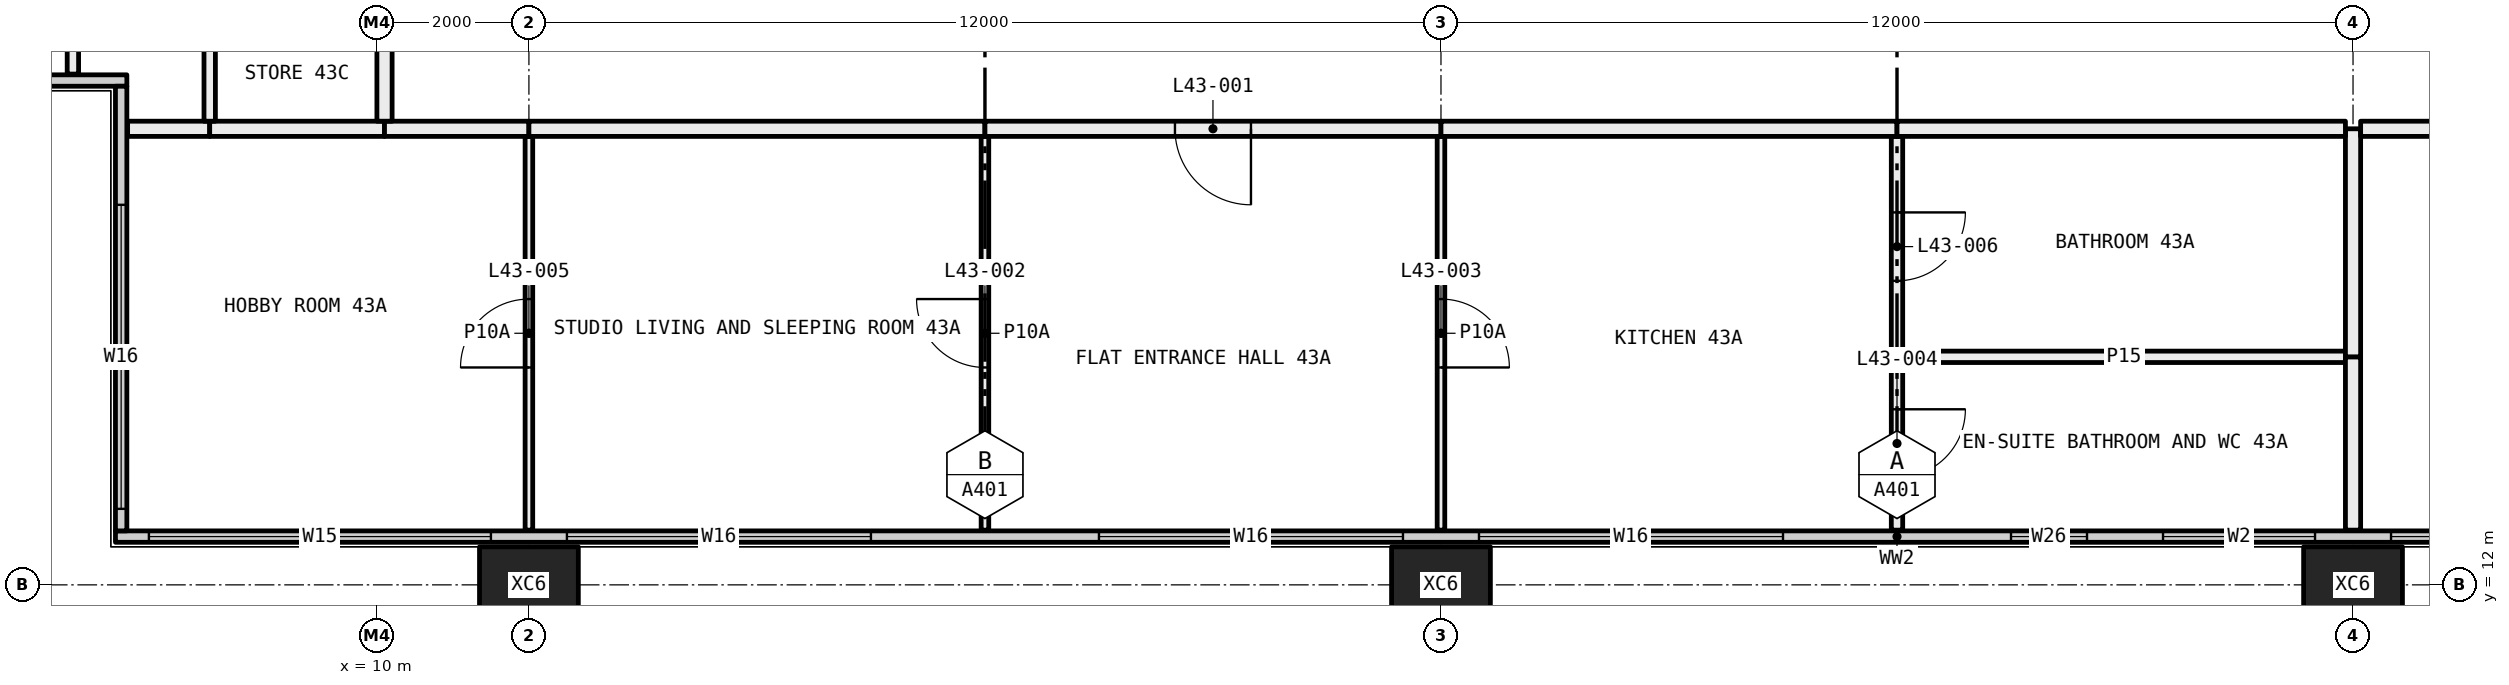
"""IFC4 building model, lengths in metres.
Left out: names, types, materials, properties, quantities, classifications, styles, units other than length and angle.
Written with IfcOpenShell. Run it as: python <this file> out.ifc"""

import sys

from ifc_helpers import new_model, si_unit, direction, frame, frame_2d, origin, origin_2d, place, context, subcontext, project, spatial, rectangle, hollow_rectangle, extrude, element, fill, save


model = new_model("IFC4")
c1 = context("Model", 3, precision=1e-05, world=origin(), true_north=direction((0.0, 1.0)))
c2 = subcontext(c1, "Body", "Model", "MODEL_VIEW")
j1 = project(units=[si_unit("LENGTHUNIT", "METRE"), si_unit("PLANEANGLEUNIT", "RADIAN")], contexts=[c1])
p1 = place(None, origin())
s1 = spatial("IfcSite", under=j1, at=p1, CompositionType="ELEMENT")
p2 = place(p1, origin())
s2 = spatial("IfcBuilding", under=s1, at=p2, CompositionType="ELEMENT")
p3 = place(p2, frame((0.0, 0.0, 165.15)))
s3 = spatial("IfcBuildingStorey", under=s2, at=p3, CompositionType="ELEMENT", Elevation=165.15)
for number, where, z_axis, x_axis in (
    (1, (12.0, 12.0, -0.4), (0.0, 0.0, 1.0), (1.0, 0.0, 0.0)),
    (2, (24.0, 12.0, -0.4), (0.0, 0.0, 1.0), (1.0, 0.0, 0.0)),
    (3, (36.0, 12.0, -0.4), (0.0, 0.0, 1.0), (1.0, 0.0, 0.0)),
):
    element("IfcColumn", number, at=place(p3, frame(where, z_axis=z_axis, x_axis=x_axis)), inside=s3, PredefinedType="COLUMN", context=c2, shape_type="SweptSolid", body=[
        extrude(hollow_rectangle(XDim=1.3, YDim=1.0, WallThickness=0.05, at=origin_2d()), origin(), (0.0, 0.0, 1.0), 3.45),
    ])
p4 = place(p3, frame((6.56, 12.635, 0.0), z_axis=(0.0, 0.0, 1.0), x_axis=(1.0, 0.0, 0.0)))
e4 = element("IfcWall", 4, at=p4, inside=s3, PredefinedType="ELEMENTEDWALL", context=c2, shape_type="SweptSolid", body=[
    extrude(rectangle(XDim=46.88, YDim=0.15, at=frame_2d((23.44, 0.0))), origin(), (0.0, 0.0, 1.0), 3.05),
])
p5 = place(p4, frame((0.44, 0.0, 0.45)))
e5 = element("IfcOpeningElement", 5, at=p5, cuts=e4, PredefinedType="OPENING", context=c2, shape_type="SweptSolid", body=[
    extrude(rectangle(XDim=4.5, YDim=2.55, at=frame_2d((2.25, 1.275))), frame((0.0, 0.085, 0.0), z_axis=(0.0, -1.0, 0.0), x_axis=(1.0, 0.0, 0.0)), (0.0, 0.0, 1.0), 0.17),
])
p6 = place(p4, frame((5.94, 0.0, 0.45)))
e6 = element("IfcOpeningElement", 6, at=p6, cuts=e4, PredefinedType="OPENING", context=c2, shape_type="SweptSolid", body=[
    extrude(rectangle(XDim=4.0, YDim=2.55, at=frame_2d((2.0, 1.275))), frame((0.0, 0.085, 0.0), z_axis=(0.0, -1.0, 0.0), x_axis=(1.0, 0.0, 0.0)), (0.0, 0.0, 1.0), 0.17),
])
p7 = place(p4, frame((12.94, 0.0, 0.45)))
e7 = element("IfcOpeningElement", 7, at=p7, cuts=e4, PredefinedType="OPENING", context=c2, shape_type="SweptSolid", body=[
    extrude(rectangle(XDim=4.0, YDim=2.55, at=frame_2d((2.0, 1.275))), frame((0.0, 0.085, 0.0), z_axis=(0.0, -1.0, 0.0), x_axis=(1.0, 0.0, 0.0)), (0.0, 0.0, 1.0), 0.17),
])
p8 = place(p4, frame((17.94, 0.0, 0.45)))
e8 = element("IfcOpeningElement", 8, at=p8, cuts=e4, PredefinedType="OPENING", context=c2, shape_type="SweptSolid", body=[
    extrude(rectangle(XDim=4.0, YDim=2.55, at=frame_2d((2.0, 1.275))), frame((0.0, 0.085, 0.0), z_axis=(0.0, -1.0, 0.0), x_axis=(1.0, 0.0, 0.0)), (0.0, 0.0, 1.0), 0.17),
])
p9 = place(p4, frame((24.94, 0.0, 0.45)))
e9 = element("IfcOpeningElement", 9, at=p9, cuts=e4, PredefinedType="OPENING", context=c2, shape_type="SweptSolid", body=[
    extrude(rectangle(XDim=1.0, YDim=2.55, at=frame_2d((0.5, 1.275))), frame((0.0, 0.085, 0.0), z_axis=(0.0, -1.0, 0.0), x_axis=(1.0, 0.0, 0.0)), (0.0, 0.0, 1.0), 0.17),
])
p10 = place(p4, frame((26.94, 0.0, 0.45)))
e10 = element("IfcOpeningElement", 10, at=p10, cuts=e4, PredefinedType="OPENING", context=c2, shape_type="SweptSolid", body=[
    extrude(rectangle(XDim=2.0, YDim=2.55, at=frame_2d((1.0, 1.275))), frame((0.0, 0.085, 0.0), z_axis=(0.0, -1.0, 0.0), x_axis=(1.0, 0.0, 0.0)), (0.0, 0.0, 1.0), 0.17),
])
p11 = place(p4, frame((29.94, 0.0, 0.45)))
e11 = element("IfcOpeningElement", 11, at=p11, cuts=e4, PredefinedType="OPENING", context=c2, shape_type="SweptSolid", body=[
    extrude(rectangle(XDim=4.0, YDim=2.55, at=frame_2d((2.0, 1.275))), frame((0.0, 0.085, 0.0), z_axis=(0.0, -1.0, 0.0), x_axis=(1.0, 0.0, 0.0)), (0.0, 0.0, 1.0), 0.17),
])
p12 = place(p4, frame((36.94, 0.0, 0.45)))
e12 = element("IfcOpeningElement", 12, at=p12, cuts=e4, PredefinedType="OPENING", context=c2, shape_type="SweptSolid", body=[
    extrude(rectangle(XDim=4.0, YDim=2.55, at=frame_2d((2.0, 1.275))), frame((0.0, 0.085, 0.0), z_axis=(0.0, -1.0, 0.0), x_axis=(1.0, 0.0, 0.0)), (0.0, 0.0, 1.0), 0.17),
])
p13 = place(p4, frame((41.94, 0.0, 0.45)))
e13 = element("IfcOpeningElement", 13, at=p13, cuts=e4, PredefinedType="OPENING", context=c2, shape_type="SweptSolid", body=[
    extrude(rectangle(XDim=4.5, YDim=2.55, at=frame_2d((2.25, 1.275))), frame((0.0, 0.085, 0.0), z_axis=(0.0, -1.0, 0.0), x_axis=(1.0, 0.0, 0.0)), (0.0, 0.0, 1.0), 0.17),
])
p14 = place(p3, frame((0.56, 18.635, 0.0), z_axis=(0.0, 0.0, 1.0), x_axis=(1.0, 0.0, 0.0)))
e14 = element("IfcWall", 14, at=p14, inside=s3, PredefinedType="ELEMENTEDWALL", context=c2, shape_type="SweptSolid", body=[
    extrude(rectangle(XDim=6.15, YDim=0.15, at=frame_2d((3.075, 0.0))), origin(), (0.0, 0.0, 1.0), 3.05),
])
p15 = place(p14, frame((0.44, 0.0, 0.45)))
e15 = element("IfcOpeningElement", 15, at=p15, cuts=e14, PredefinedType="OPENING", context=c2, shape_type="SweptSolid", body=[
    extrude(rectangle(XDim=4.0, YDim=2.55, at=frame_2d((2.0, 1.275))), frame((0.0, 0.085, 0.0), z_axis=(0.0, -1.0, 0.0), x_axis=(1.0, 0.0, 0.0)), (0.0, 0.0, 1.0), 0.17),
])
p16 = place(p3, frame((6.635, 12.71, 0.0), z_axis=(0.0, 0.0, 1.0), x_axis=(0.0, 1.0, 0.0)))
e16 = element("IfcWall", 16, at=p16, inside=s3, PredefinedType="ELEMENTEDWALL", context=c2, shape_type="SweptSolid", body=[
    extrude(rectangle(XDim=5.85, YDim=0.15, at=frame_2d((2.925, 0.0))), origin(), (0.0, 0.0, 1.0), 3.05),
])
p17 = place(p16, frame((0.29, 0.0, 0.45)))
e17 = element("IfcOpeningElement", 17, at=p17, cuts=e16, PredefinedType="OPENING", context=c2, shape_type="SweptSolid", body=[
    extrude(rectangle(XDim=4.0, YDim=2.55, at=frame_2d((2.0, 1.275))), frame((0.0, 0.085, 0.0), z_axis=(0.0, -1.0, 0.0), x_axis=(1.0, 0.0, 0.0)), (0.0, 0.0, 1.0), 0.17),
])
p18 = place(p3, frame((12.0, 12.72, 0.0), z_axis=(0.0, 0.0, 1.0), x_axis=(0.0, 1.0, 0.0)))
e18 = element("IfcWall", 18, at=p18, inside=s3, PredefinedType="PARTITIONING", context=c2, shape_type="SweptSolid", body=[
    extrude(rectangle(XDim=5.18, YDim=0.1, at=frame_2d((2.59, 0.0))), origin(), (0.0, 0.0, 1.0), 3.05),
])
p19 = place(p18, frame((2.14, 0.0, 0.0)))
e19 = element("IfcOpeningElement", 19, at=p19, cuts=e18, PredefinedType="OPENING", context=c2, shape_type="SweptSolid", body=[
    extrude(rectangle(XDim=0.9, YDim=2.1, at=frame_2d((0.45, 1.05))), frame((0.0, 0.06, 0.0), z_axis=(0.0, -1.0, 0.0), x_axis=(1.0, 0.0, 0.0)), (0.0, 0.0, 1.0), 0.12),
])
p20 = place(p3, frame((7.8, 18.0, 0.0), z_axis=(0.0, 0.0, 1.0), x_axis=(-1.0, 0.0, 0.0)))
e20 = element("IfcWall", 20, at=p20, inside=s3, PredefinedType="PARTITIONING", context=c2, shape_type="SweptSolid", body=[
    extrude(rectangle(XDim=1.08, YDim=0.2, at=frame_2d((0.54, 0.0))), origin(), (0.0, 0.0, 1.0), 3.05),
])
p21 = place(p3, frame((10.1, 18.0, 0.0), z_axis=(0.0, 0.0, 1.0), x_axis=(-1.0, 0.0, 0.0)))
e21 = element("IfcWall", 21, at=p21, inside=s3, PredefinedType="PARTITIONING", context=c2, shape_type="SweptSolid", body=[
    extrude(rectangle(XDim=2.3, YDim=0.2, at=frame_2d((1.15, 0.0))), origin(), (0.0, 0.0, 1.0), 3.05),
])
p22 = place(p3, frame((12.0, 18.0, 0.0), z_axis=(0.0, 0.0, 1.0), x_axis=(-1.0, 0.0, 0.0)))
e22 = element("IfcWall", 22, at=p22, inside=s3, PredefinedType="PARTITIONING", context=c2, shape_type="SweptSolid", body=[
    extrude(rectangle(XDim=1.9, YDim=0.2, at=frame_2d((0.95, 0.0))), origin(), (0.0, 0.0, 1.0), 3.05),
])
p23 = place(p3, frame((18.0, 12.72, 0.0), z_axis=(0.0, 0.0, 1.0), x_axis=(0.0, 1.0, 0.0)))
e23 = element("IfcWall", 23, at=p23, inside=s3, PredefinedType="PARTITIONING", context=c2, shape_type="SweptSolid", body=[
    extrude(rectangle(XDim=5.18, YDim=0.1, at=frame_2d((2.59, 0.0))), origin(), (0.0, 0.0, 1.0), 3.05),
])
p24 = place(p23, frame((2.14, 0.0, 0.0)))
e24 = element("IfcOpeningElement", 24, at=p24, cuts=e23, PredefinedType="OPENING", context=c2, shape_type="SweptSolid", body=[
    extrude(rectangle(XDim=0.9, YDim=2.1, at=frame_2d((0.45, 1.05))), frame((0.0, 0.06, 0.0), z_axis=(0.0, -1.0, 0.0), x_axis=(1.0, 0.0, 0.0)), (0.0, 0.0, 1.0), 0.12),
])
p25 = place(p3, frame((18.0, 18.0, 0.0), z_axis=(0.0, 0.0, 1.0), x_axis=(-1.0, 0.0, 0.0)))
e25 = element("IfcWall", 25, at=p25, inside=s3, PredefinedType="PARTITIONING", context=c2, shape_type="SweptSolid", body=[
    extrude(rectangle(XDim=6.0, YDim=0.2, at=frame_2d((3.0, 0.0))), origin(), (0.0, 0.0, 1.0), 3.05),
])
p26 = place(p3, frame((24.0, 12.72, 0.0), z_axis=(0.0, 0.0, 1.0), x_axis=(0.0, 1.0, 0.0)))
e26 = element("IfcWall", 26, at=p26, inside=s3, PredefinedType="PARTITIONING", context=c2, shape_type="SweptSolid", body=[
    extrude(rectangle(XDim=5.18, YDim=0.1, at=frame_2d((2.59, 0.0))), origin(), (0.0, 0.0, 1.0), 3.05),
])
p27 = place(p26, frame((2.14, 0.0, 0.0)))
e27 = element("IfcOpeningElement", 27, at=p27, cuts=e26, PredefinedType="OPENING", context=c2, shape_type="SweptSolid", body=[
    extrude(rectangle(XDim=0.9, YDim=2.1, at=frame_2d((0.45, 1.05))), frame((0.0, 0.06, 0.0), z_axis=(0.0, -1.0, 0.0), x_axis=(1.0, 0.0, 0.0)), (0.0, 0.0, 1.0), 0.12),
])
p28 = place(p3, frame((24.0, 18.0, 0.0), z_axis=(0.0, 0.0, 1.0), x_axis=(-1.0, 0.0, 0.0)))
e28 = element("IfcWall", 28, at=p28, inside=s3, PredefinedType="PARTITIONING", context=c2, shape_type="SweptSolid", body=[
    extrude(rectangle(XDim=6.0, YDim=0.2, at=frame_2d((3.0, 0.0))), origin(), (0.0, 0.0, 1.0), 3.05),
])
p29 = place(p28, frame((2.5, 0.0, 0.0)))
e29 = element("IfcOpeningElement", 29, at=p29, cuts=e28, PredefinedType="OPENING", context=c2, shape_type="SweptSolid", body=[
    extrude(rectangle(XDim=1.0, YDim=2.1, at=frame_2d((0.5, 1.05))), frame((0.0, 0.11, 0.0), z_axis=(0.0, -1.0, 0.0), x_axis=(1.0, 0.0, 0.0)), (0.0, 0.0, 1.0), 0.22),
])
p30 = place(p3, frame((30.0, 12.72, 0.0), z_axis=(0.0, 0.0, 1.0), x_axis=(0.0, 1.0, 0.0)))
e30 = element("IfcWall", 30, at=p30, inside=s3, PredefinedType="PARTITIONING", context=c2, shape_type="SweptSolid", body=[
    extrude(rectangle(XDim=2.28, YDim=0.15, at=frame_2d((1.14, 0.0))), origin(), (0.0, 0.0, 1.0), 3.05),
])
p31 = place(p30, frame((0.69, 0.0, 0.0)))
e31 = element("IfcOpeningElement", 31, at=p31, cuts=e30, PredefinedType="OPENING", context=c2, shape_type="SweptSolid", body=[
    extrude(rectangle(XDim=0.9, YDim=2.1, at=frame_2d((0.45, 1.05))), frame((0.0, 0.085, 0.0), z_axis=(0.0, -1.0, 0.0), x_axis=(1.0, 0.0, 0.0)), (0.0, 0.0, 1.0), 0.17),
])
p32 = place(p3, frame((30.0, 15.0, 0.0), z_axis=(0.0, 0.0, 1.0), x_axis=(0.0, 1.0, 0.0)))
e32 = element("IfcWall", 32, at=p32, inside=s3, PredefinedType="PARTITIONING", context=c2, shape_type="SweptSolid", body=[
    extrude(rectangle(XDim=2.9, YDim=0.15, at=frame_2d((1.45, 0.0))), origin(), (0.0, 0.0, 1.0), 3.05),
])
p33 = place(p32, frame((1.0, 0.0, 0.0)))
e33 = element("IfcOpeningElement", 33, at=p33, cuts=e32, PredefinedType="OPENING", context=c2, shape_type="SweptSolid", body=[
    extrude(rectangle(XDim=0.9, YDim=2.1, at=frame_2d((0.45, 1.05))), frame((0.0, 0.085, 0.0), z_axis=(0.0, -1.0, 0.0), x_axis=(1.0, 0.0, 0.0)), (0.0, 0.0, 1.0), 0.17),
])
p34 = place(p3, frame((30.0, 18.0, 0.0), z_axis=(0.0, 0.0, 1.0), x_axis=(-1.0, 0.0, 0.0)))
e34 = element("IfcWall", 34, at=p34, inside=s3, PredefinedType="PARTITIONING", context=c2, shape_type="SweptSolid", body=[
    extrude(rectangle(XDim=6.0, YDim=0.2, at=frame_2d((3.0, 0.0))), origin(), (0.0, 0.0, 1.0), 3.05),
])
p35 = place(p3, frame((35.9, 15.0, 0.0), z_axis=(0.0, 0.0, 1.0), x_axis=(-1.0, 0.0, 0.0)))
e35 = element("IfcWall", 35, at=p35, inside=s3, PredefinedType="PARTITIONING", context=c2, shape_type="SweptSolid", body=[
    extrude(rectangle(XDim=5.825, YDim=0.15, at=frame_2d((2.913, 0.0))), origin(), (0.0, 0.0, 1.0), 3.05),
])
p36 = place(p3, frame((36.0, 12.72, 0.0), z_axis=(0.0, 0.0, 1.0), x_axis=(0.0, 1.0, 0.0)))
e36 = element("IfcWall", 36, at=p36, inside=s3, PredefinedType="PARTITIONING", context=c2, shape_type="SweptSolid", body=[
    extrude(rectangle(XDim=2.28, YDim=0.2, at=frame_2d((1.14, 0.0))), origin(), (0.0, 0.0, 1.0), 2.45),
])
p37 = place(p3, frame((36.0, 15.0, 0.0), z_axis=(0.0, 0.0, 1.0), x_axis=(0.0, 1.0, 0.0)))
e37 = element("IfcWall", 37, at=p37, inside=s3, PredefinedType="PARTITIONING", context=c2, shape_type="SweptSolid", body=[
    extrude(rectangle(XDim=3.0, YDim=0.2, at=frame_2d((1.5, 0.0))), origin(), (0.0, 0.0, 1.0), 2.45),
])
p38 = place(p3, frame((35.9, 18.0, 0.0), z_axis=(0.0, 0.0, 1.0), x_axis=(-1.0, 0.0, 0.0)))
e38 = element("IfcWall", 38, at=p38, inside=s3, PredefinedType="PARTITIONING", context=c2, shape_type="SweptSolid", body=[
    extrude(rectangle(XDim=5.9, YDim=0.2, at=frame_2d((2.95, 0.0))), origin(), (0.0, 0.0, 1.0), 3.05),
])
p39 = place(p3, frame((6.0, 18.72, 0.0), z_axis=(0.0, 0.0, 1.0), x_axis=(0.0, 1.0, 0.0)))
e39 = element("IfcWall", 39, at=p39, inside=s3, PredefinedType="PARTITIONING", context=c2, shape_type="SweptSolid", body=[
    extrude(rectangle(XDim=2.28, YDim=0.15, at=frame_2d((1.14, 0.0))), origin(), (0.0, 0.0, 1.0), 3.05),
])
p40 = place(p3, frame((7.8, 18.1, 0.0), z_axis=(0.0, 0.0, 1.0), x_axis=(0.0, 1.0, 0.0)))
e40 = element("IfcWall", 40, at=p40, inside=s3, PredefinedType="PARTITIONING", context=c2, shape_type="SweptSolid", body=[
    extrude(rectangle(XDim=2.9, YDim=0.15, at=frame_2d((1.45, 0.0))), origin(), (0.0, 0.0, 1.0), 3.05),
])
p41 = place(p3, frame((10.1, 18.1, 0.0), z_axis=(0.0, 0.0, 1.0), x_axis=(0.0, 1.0, 0.0)))
e41 = element("IfcWall", 41, at=p41, inside=s3, PredefinedType="PARTITIONING", context=c2, shape_type="SweptSolid", body=[
    extrude(rectangle(XDim=2.9, YDim=0.2, at=frame_2d((1.45, 0.0))), origin(), (0.0, 0.0, 1.0), 3.05),
])
p42 = place(p3, frame((53.28, 18.0, 0.0), z_axis=(0.0, 0.0, 1.0), x_axis=(-1.0, 0.0, 0.0)))
e42 = element("IfcWall", 42, at=p42, inside=s3, PredefinedType="PARTITIONING", context=c2, shape_type="SweptSolid", body=[
    extrude(rectangle(XDim=17.18, YDim=0.2, at=frame_2d((8.59, 0.0))), origin(), (0.0, 0.0, 1.0), 3.05),
])
p43 = place(p42, frame((7.79, 0.0, 0.0)))
e43 = element("IfcOpeningElement", 43, at=p43, cuts=e42, PredefinedType="OPENING", context=c2, shape_type="SweptSolid", body=[
    extrude(rectangle(XDim=1.6, YDim=2.1, at=frame_2d((0.8, 1.05))), frame((0.0, 0.11, 0.0), z_axis=(0.0, -1.0, 0.0), x_axis=(1.0, 0.0, 0.0)), (0.0, 0.0, 1.0), 0.22),
])
p44 = place(p5, origin())
e44 = element("IfcWindow", 44, at=p44, inside=s3, PartitioningType="SINGLE_PANEL", PredefinedType="WINDOW", context=c2, shape_type="SweptSolid", body=[
    extrude(rectangle(XDim=4.5, YDim=2.55, at=frame_2d((2.25, 1.275))), frame((0.0, 0.03, 0.0), z_axis=(0.0, -1.0, 0.0), x_axis=(1.0, 0.0, 0.0)), (0.0, 0.0, 1.0), 0.06),
])
fill(e5, e44)
p45 = place(p6, origin())
e45 = element("IfcWindow", 45, at=p45, inside=s3, PartitioningType="SINGLE_PANEL", PredefinedType="WINDOW", context=c2, shape_type="SweptSolid", body=[
    extrude(rectangle(XDim=4.0, YDim=2.55, at=frame_2d((2.0, 1.275))), frame((0.0, 0.03, 0.0), z_axis=(0.0, -1.0, 0.0), x_axis=(1.0, 0.0, 0.0)), (0.0, 0.0, 1.0), 0.06),
])
fill(e6, e45)
p46 = place(p7, origin())
e46 = element("IfcWindow", 46, at=p46, inside=s3, PartitioningType="SINGLE_PANEL", PredefinedType="WINDOW", context=c2, shape_type="SweptSolid", body=[
    extrude(rectangle(XDim=4.0, YDim=2.55, at=frame_2d((2.0, 1.275))), frame((0.0, 0.03, 0.0), z_axis=(0.0, -1.0, 0.0), x_axis=(1.0, 0.0, 0.0)), (0.0, 0.0, 1.0), 0.06),
])
fill(e7, e46)
p47 = place(p8, origin())
e47 = element("IfcWindow", 47, at=p47, inside=s3, PartitioningType="SINGLE_PANEL", PredefinedType="WINDOW", context=c2, shape_type="SweptSolid", body=[
    extrude(rectangle(XDim=4.0, YDim=2.55, at=frame_2d((2.0, 1.275))), frame((0.0, 0.03, 0.0), z_axis=(0.0, -1.0, 0.0), x_axis=(1.0, 0.0, 0.0)), (0.0, 0.0, 1.0), 0.06),
])
fill(e8, e47)
p48 = place(p9, origin())
e48 = element("IfcWindow", 48, at=p48, inside=s3, PartitioningType="SINGLE_PANEL", PredefinedType="WINDOW", context=c2, shape_type="SweptSolid", body=[
    extrude(rectangle(XDim=1.0, YDim=2.55, at=frame_2d((0.5, 1.275))), frame((0.0, 0.03, 0.0), z_axis=(0.0, -1.0, 0.0), x_axis=(1.0, 0.0, 0.0)), (0.0, 0.0, 1.0), 0.06),
])
fill(e9, e48)
p49 = place(p10, origin())
e49 = element("IfcWindow", 49, at=p49, inside=s3, PartitioningType="SINGLE_PANEL", PredefinedType="WINDOW", context=c2, shape_type="SweptSolid", body=[
    extrude(rectangle(XDim=2.0, YDim=2.55, at=frame_2d((1.0, 1.275))), frame((0.0, 0.03, 0.0), z_axis=(0.0, -1.0, 0.0), x_axis=(1.0, 0.0, 0.0)), (0.0, 0.0, 1.0), 0.06),
])
fill(e10, e49)
p50 = place(p11, origin())
e50 = element("IfcWindow", 50, at=p50, inside=s3, PartitioningType="SINGLE_PANEL", PredefinedType="WINDOW", context=c2, shape_type="SweptSolid", body=[
    extrude(rectangle(XDim=4.0, YDim=2.55, at=frame_2d((2.0, 1.275))), frame((0.0, 0.03, 0.0), z_axis=(0.0, -1.0, 0.0), x_axis=(1.0, 0.0, 0.0)), (0.0, 0.0, 1.0), 0.06),
])
fill(e11, e50)
p51 = place(p17, origin())
e51 = element("IfcWindow", 51, at=p51, inside=s3, PartitioningType="SINGLE_PANEL", PredefinedType="WINDOW", context=c2, shape_type="SweptSolid", body=[
    extrude(rectangle(XDim=4.0, YDim=2.55, at=frame_2d((2.0, 1.275))), frame((0.0, 0.03, 0.0), z_axis=(0.0, -1.0, 0.0), x_axis=(1.0, 0.0, 0.0)), (0.0, 0.0, 1.0), 0.06),
])
fill(e17, e51)
p52 = place(p29, origin())
e52 = element("IfcDoor", 52, at=p52, inside=s3, OperationType="SINGLE_SWING_RIGHT", PredefinedType="DOOR", context=c2, shape_type="SweptSolid", body=[
    extrude(rectangle(XDim=1.0, YDim=2.1, at=frame_2d((0.5, 1.05))), frame((0.0, 0.025, 0.0), z_axis=(0.0, -1.0, 0.0), x_axis=(1.0, 0.0, 0.0)), (0.0, 0.0, 1.0), 0.05),
])
fill(e29, e52)
p53 = place(p24, origin())
e53 = element("IfcDoor", 53, at=p53, inside=s3, OperationType="SINGLE_SWING_LEFT", PredefinedType="DOOR", context=c2, shape_type="SweptSolid", body=[
    extrude(rectangle(XDim=0.9, YDim=2.1, at=frame_2d((0.45, 1.05))), frame((0.0, 0.025, 0.0), z_axis=(0.0, -1.0, 0.0), x_axis=(1.0, 0.0, 0.0)), (0.0, 0.0, 1.0), 0.05),
])
fill(e24, e53)
p54 = place(p27, frame((0.9, 0.0, 0.0), x_axis=(-1.0, 0.0, 0.0)))
e54 = element("IfcDoor", 54, at=p54, inside=s3, OperationType="SINGLE_SWING_LEFT", PredefinedType="DOOR", context=c2, shape_type="SweptSolid", body=[
    extrude(rectangle(XDim=0.9, YDim=2.1, at=frame_2d((0.45, 1.05))), frame((0.0, 0.025, 0.0), z_axis=(0.0, -1.0, 0.0), x_axis=(1.0, 0.0, 0.0)), (0.0, 0.0, 1.0), 0.05),
])
fill(e27, e54)
p55 = place(p31, frame((0.9, 0.0, 0.0), x_axis=(-1.0, 0.0, 0.0)))
e55 = element("IfcDoor", 55, at=p55, inside=s3, OperationType="SINGLE_SWING_RIGHT", PredefinedType="DOOR", context=c2, shape_type="SweptSolid", body=[
    extrude(rectangle(XDim=0.9, YDim=2.1, at=frame_2d((0.45, 1.05))), frame((0.0, 0.025, 0.0), z_axis=(0.0, -1.0, 0.0), x_axis=(1.0, 0.0, 0.0)), (0.0, 0.0, 1.0), 0.05),
])
fill(e31, e55)
p56 = place(p19, origin())
e56 = element("IfcDoor", 56, at=p56, inside=s3, OperationType="SINGLE_SWING_RIGHT", PredefinedType="DOOR", context=c2, shape_type="SweptSolid", body=[
    extrude(rectangle(XDim=0.9, YDim=2.1, at=frame_2d((0.45, 1.05))), frame((0.0, 0.025, 0.0), z_axis=(0.0, -1.0, 0.0), x_axis=(1.0, 0.0, 0.0)), (0.0, 0.0, 1.0), 0.05),
])
fill(e19, e56)
p57 = place(p33, frame((0.9, 0.0, 0.0), x_axis=(-1.0, 0.0, 0.0)))
e57 = element("IfcDoor", 57, at=p57, inside=s3, OperationType="SINGLE_SWING_RIGHT", PredefinedType="DOOR", context=c2, shape_type="SweptSolid", body=[
    extrude(rectangle(XDim=0.9, YDim=2.1, at=frame_2d((0.45, 1.05))), frame((0.0, 0.025, 0.0), z_axis=(0.0, -1.0, 0.0), x_axis=(1.0, 0.0, 0.0)), (0.0, 0.0, 1.0), 0.05),
])
fill(e33, e57)
save(model, sys.argv[1])
